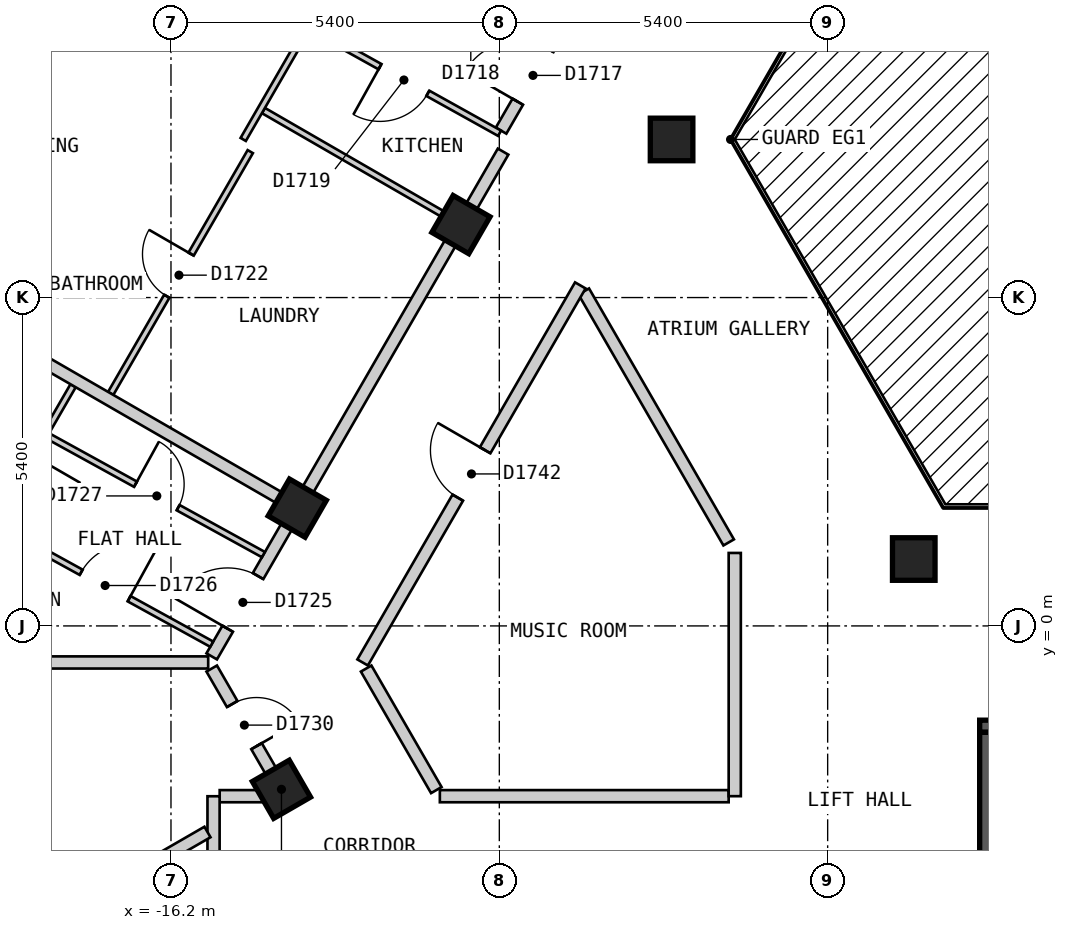
"""IFC4 building model, lengths in metres.
Left out: names, types, materials, properties, quantities, classifications, styles, units other than length and angle.
Written with IfcOpenShell. Run it as: python <this file> out.ifc"""

import sys

from ifc_helpers import new_model, si_unit, direction, frame, frame_2d, origin, origin_2d, place, context, subcontext, project, spatial, polyline, rectangle, outline, extrude, element, fill, save


model = new_model("IFC4")
c1 = context("Model", 3, precision=1e-05, world=origin(), true_north=direction((0.0, 1.0)))
c2 = subcontext(c1, "Body", "Model", "MODEL_VIEW")
j1 = project(units=[si_unit("LENGTHUNIT", "METRE"), si_unit("PLANEANGLEUNIT", "RADIAN")], contexts=[c1])
p1 = place(None, origin())
s1 = spatial("IfcSite", under=j1, at=p1, CompositionType="ELEMENT")
p2 = place(p1, origin())
s2 = spatial("IfcBuilding", under=s1, at=p2, CompositionType="ELEMENT")
p3 = place(p2, frame((0.0, 0.0, 187.2)))
s3 = spatial("IfcBuildingStorey", under=s2, at=p3, CompositionType="ELEMENT", Elevation=187.2)
for number, where, z_axis, x_axis in (
    (1, (-14.383, -2.687, 0.0), (0.0, 0.0, 1.0), (0.5, -0.866, 0.0)),
    (2, (-7.967, 8.0, 0.0), (0.0, 0.0, 1.0), (1.0, 0.0, 0.0)),
    (3, (-11.431, 6.6, 0.0), (0.0, 0.0, 1.0), (-0.5, -0.866, 0.0)),
    (4, (-3.984, 1.1, 0.0), (0.0, 0.0, 1.0), (1.0, 0.0, 0.0)),
    (5, (-14.123, 1.937, 0.0), (0.0, 0.0, 1.0), (-0.5, -0.866, 0.0)),
):
    element("IfcColumn", number, at=place(p3, frame(where, z_axis=z_axis, x_axis=x_axis)), inside=s3, PredefinedType="COLUMN", context=c2, shape_type="SweptSolid", body=[
        extrude(rectangle(XDim=0.7, YDim=0.7, at=origin_2d()), origin(), (0.0, 0.0, 1.0), 3.0),
    ])
p4 = place(p3, frame((-14.592, 21.625, 0.0), z_axis=(0.0, 0.0, 1.0), x_axis=(-0.500010537973, -0.866019319597, 0.0)))
e6 = element("IfcWall", 6, at=p4, inside=s3, PredefinedType="SOLIDWALL", context=c2, shape_type="SweptSolid", body=[
    extrude(outline(polyline([(0.0, -0.15), (22.863, -0.15), (22.783, 0.15), (0.08, 0.15), (0.0, -0.15)])), origin(), (0.0, 0.0, 1.0), 2.7),
])
p5 = place(p4, frame((2.606, 0.0, 0.15)))
e7 = element("IfcOpeningElement", 7, at=p5, cuts=e6, PredefinedType="OPENING", context=c2, shape_type="SweptSolid", body=[
    extrude(rectangle(XDim=1.5, YDim=2.1, at=frame_2d((0.75, 1.05))), frame((0.0, 0.16, 0.0), z_axis=(0.0, -1.0, 0.0), x_axis=(1.0, 0.0, 0.0)), (0.0, 0.0, 1.0), 0.32),
])
p6 = place(p4, frame((7.99, 0.0, 0.15)))
e8 = element("IfcOpeningElement", 8, at=p6, cuts=e6, PredefinedType="OPENING", context=c2, shape_type="SweptSolid", body=[
    extrude(rectangle(XDim=1.5, YDim=2.1, at=frame_2d((0.75, 1.05))), frame((0.0, 0.16, 0.0), z_axis=(0.0, -1.0, 0.0), x_axis=(1.0, 0.0, 0.0)), (0.0, 0.0, 1.0), 0.32),
])
p7 = place(p4, frame((13.373, 0.0, 0.15)))
e9 = element("IfcOpeningElement", 9, at=p7, cuts=e6, PredefinedType="OPENING", context=c2, shape_type="SweptSolid", body=[
    extrude(rectangle(XDim=1.5, YDim=2.1, at=frame_2d((0.75, 1.05))), frame((0.0, 0.16, 0.0), z_axis=(0.0, -1.0, 0.0), x_axis=(1.0, 0.0, 0.0)), (0.0, 0.0, 1.0), 0.32),
])
p8 = place(p4, frame((18.758, 0.0, 0.15)))
e10 = element("IfcOpeningElement", 10, at=p8, cuts=e6, PredefinedType="OPENING", context=c2, shape_type="SweptSolid", body=[
    extrude(rectangle(XDim=1.5, YDim=2.1, at=frame_2d((0.75, 1.05))), frame((0.0, 0.16, 0.0), z_axis=(0.0, -1.0, 0.0), x_axis=(1.0, 0.0, 0.0)), (0.0, 0.0, 1.0), 0.32),
])
p9 = place(p3, frame((-26.024, -3.025, 0.0), z_axis=(0.0, 0.0, 1.0), x_axis=(0.500018670445, -0.86601462413, 0.0)))
e11 = element("IfcWall", 11, at=p9, inside=s3, PredefinedType="SOLIDWALL", context=c2, shape_type="SweptSolid", body=[
    extrude(outline(polyline([(0.0, -0.15), (20.785, -0.15), (20.705, 0.15), (0.08, 0.15), (0.0, -0.15)])), origin(), (0.0, 0.0, 1.0), 2.7),
])
p10 = place(p9, frame((2.346, 0.0, 0.15)))
e12 = element("IfcOpeningElement", 12, at=p10, cuts=e11, PredefinedType="OPENING", context=c2, shape_type="SweptSolid", body=[
    extrude(rectangle(XDim=1.5, YDim=2.1, at=frame_2d((0.75, 1.05))), frame((0.0, 0.16, 0.0), z_axis=(0.0, -1.0, 0.0), x_axis=(1.0, 0.0, 0.0)), (0.0, 0.0, 1.0), 0.32),
])
p11 = place(p9, frame((7.21, 0.0, 0.15)))
e13 = element("IfcOpeningElement", 13, at=p11, cuts=e11, PredefinedType="OPENING", context=c2, shape_type="SweptSolid", body=[
    extrude(rectangle(XDim=1.5, YDim=2.1, at=frame_2d((0.75, 1.05))), frame((0.0, 0.16, 0.0), z_axis=(0.0, -1.0, 0.0), x_axis=(1.0, 0.0, 0.0)), (0.0, 0.0, 1.0), 0.32),
])
p12 = place(p9, frame((12.073, 0.0, 0.15)))
e14 = element("IfcOpeningElement", 14, at=p12, cuts=e11, PredefinedType="OPENING", context=c2, shape_type="SweptSolid", body=[
    extrude(rectangle(XDim=1.5, YDim=2.1, at=frame_2d((0.75, 1.05))), frame((0.0, 0.16, 0.0), z_axis=(0.0, -1.0, 0.0), x_axis=(1.0, 0.0, 0.0)), (0.0, 0.0, 1.0), 0.32),
])
p13 = place(p9, frame((16.938, 0.0, 0.15)))
e15 = element("IfcOpeningElement", 15, at=p13, cuts=e11, PredefinedType="OPENING", context=c2, shape_type="SweptSolid", body=[
    extrude(rectangle(XDim=1.5, YDim=2.1, at=frame_2d((0.75, 1.05))), frame((0.0, 0.16, 0.0), z_axis=(0.0, -1.0, 0.0), x_axis=(1.0, 0.0, 0.0)), (0.0, 0.0, 1.0), 0.32),
])
p14 = place(p3, frame((-2.9, -1.65, 0.0), z_axis=(0.0, 0.0, 1.0), x_axis=(1.0, 0.0, 0.0)))
e16 = element("IfcWall", 16, at=p14, inside=s3, PredefinedType="SOLIDWALL", context=c2, shape_type="SweptSolid", body=[
    extrude(rectangle(XDim=5.8, YDim=0.2, at=frame_2d((2.9, 0.0))), origin(), (0.0, 0.0, 1.0), 2.7),
])
p15 = place(p14, frame((0.3, 0.0, 0.0)))
e17 = element("IfcOpeningElement", 17, at=p15, cuts=e16, PredefinedType="OPENING", context=c2, shape_type="SweptSolid", body=[
    extrude(rectangle(XDim=1.2, YDim=2.1, at=frame_2d((0.6, 1.05))), frame((0.0, 0.11, 0.0), z_axis=(0.0, -1.0, 0.0), x_axis=(1.0, 0.0, 0.0)), (0.0, 0.0, 1.0), 0.22),
])
p16 = place(p3, frame((-2.8, -4.5, 0.0), z_axis=(0.0, 0.0, 1.0), x_axis=(0.0, 1.0, 0.0)))
e18 = element("IfcWall", 18, at=p16, inside=s3, PredefinedType="SOLIDWALL", context=c2, shape_type="SweptSolid", body=[
    extrude(rectangle(XDim=2.75, YDim=0.2, at=frame_2d((1.375, 0.0))), origin(), (0.0, 0.0, 1.0), 2.7),
])
p17 = place(p3, frame((-9.411, 5.5, 0.0), z_axis=(0.0, 0.0, 1.0), x_axis=(0.500018099276, -0.86601495391, 0.0)))
e19 = element("IfcWall", 19, at=p17, inside=s3, PredefinedType="PARTITIONING", context=c2, shape_type="SweptSolid", body=[
    extrude(rectangle(XDim=4.765, YDim=0.2, at=frame_2d((2.383, 0.0))), origin(), (0.0, 0.0, 1.0), 2.7),
])
p18 = place(p3, frame((-12.99, -0.701, 0.0), z_axis=(0.0, 0.0, 1.0), x_axis=(0.499972710878, -0.866041158593, 0.0)))
e20 = element("IfcWall", 20, at=p18, inside=s3, PredefinedType="PARTITIONING", context=c2, shape_type="SweptSolid", body=[
    extrude(rectangle(XDim=2.308, YDim=0.2, at=frame_2d((1.154, 0.0))), origin(), (0.0, 0.0, 1.0), 2.7),
])
p19 = place(p3, frame((-15.53, -0.701, 0.0), z_axis=(0.0, 0.0, 1.0), x_axis=(0.499972710878, -0.866041158593, 0.0)))
e21 = element("IfcWall", 21, at=p19, inside=s3, PredefinedType="PARTITIONING", context=c2, shape_type="SweptSolid", body=[
    extrude(rectangle(XDim=2.308, YDim=0.2, at=frame_2d((1.154, 0.0))), origin(), (0.0, 0.0, 1.0), 2.7),
])
p20 = place(p19, frame((0.674, 0.0, 0.0)))
e22 = element("IfcOpeningElement", 22, at=p20, cuts=e21, PredefinedType="OPENING", context=c2, shape_type="SweptSolid", body=[
    extrude(rectangle(XDim=0.8, YDim=2.1, at=frame_2d((0.4, 1.05))), frame((0.0, 0.11, 0.0), z_axis=(0.0, -1.0, 0.0), x_axis=(1.0, 0.0, 0.0)), (0.0, 0.0, 1.0), 0.22),
])
p21 = place(p3, frame((-15.399, -2.8, 0.0), z_axis=(0.0, 0.0, 1.0), x_axis=(1.0, 0.0, 0.0)))
e23 = element("IfcWall", 23, at=p21, inside=s3, PredefinedType="PARTITIONING", context=c2, shape_type="SweptSolid", body=[
    extrude(rectangle(XDim=1.081, YDim=0.2, at=frame_2d((0.541, 0.0))), origin(), (0.0, 0.0, 1.0), 2.7),
])
p22 = place(p3, frame((-11.778, -2.8, 0.0), z_axis=(0.0, 0.0, 1.0), x_axis=(1.0, 0.0, 0.0)))
e24 = element("IfcWall", 24, at=p22, inside=s3, PredefinedType="PARTITIONING", context=c2, shape_type="SweptSolid", body=[
    extrude(rectangle(XDim=4.75, YDim=0.2, at=frame_2d((2.375, 0.0))), origin(), (0.0, 0.0, 1.0), 2.7),
])
p23 = place(p3, frame((-13.048, -0.601, 0.0), z_axis=(0.0, 0.0, 1.0), x_axis=(0.499982180423, 0.866035691677, 0.0)))
e25 = element("IfcWall", 25, at=p23, inside=s3, PredefinedType="PARTITIONING", context=c2, shape_type="SweptSolid", body=[
    extrude(rectangle(XDim=7.16, YDim=0.2, at=frame_2d((3.58, 0.0))), origin(), (0.0, 0.0, 1.0), 2.7),
])
p24 = place(p23, frame((3.13, 0.0, 0.0)))
e26 = element("IfcOpeningElement", 26, at=p24, cuts=e25, PredefinedType="OPENING", context=c2, shape_type="SweptSolid", body=[
    extrude(rectangle(XDim=0.9, YDim=2.1, at=frame_2d((0.45, 1.05))), frame((0.0, 0.11, 0.0), z_axis=(0.0, -1.0, 0.0), x_axis=(1.0, 0.0, 0.0)), (0.0, 0.0, 1.0), 0.22),
])
p25 = place(p3, frame((-15.53, -0.501, 0.0), z_axis=(0.0, 0.0, 1.0), x_axis=(0.499952498232, 0.866052827206, 0.0)))
e27 = element("IfcWall", 27, at=p25, inside=s3, PredefinedType="PARTITIONING", context=c2, shape_type="SweptSolid", body=[
    extrude(rectangle(XDim=9.585, YDim=0.2, at=frame_2d((4.792, 0.0))), origin(), (0.0, 0.0, 1.0), 2.7),
])
p26 = place(p25, frame((0.525, 0.0, 0.0)))
e28 = element("IfcOpeningElement", 28, at=p26, cuts=e27, PredefinedType="OPENING", context=c2, shape_type="SweptSolid", body=[
    extrude(rectangle(XDim=1.0, YDim=2.1, at=frame_2d((0.5, 1.05))), frame((0.0, 0.11, 0.0), z_axis=(0.0, -1.0, 0.0), x_axis=(1.0, 0.0, 0.0)), (0.0, 0.0, 1.0), 0.22),
])
p27 = place(p3, frame((-10.771, 8.145, 0.0), z_axis=(0.0, 0.0, 1.0), x_axis=(0.500048075867, 0.865997645391, 0.0)))
e29 = element("IfcWall", 29, at=p27, inside=s3, PredefinedType="PARTITIONING", context=c2, shape_type="SweptSolid", body=[
    extrude(rectangle(XDim=10.687, YDim=0.2, at=frame_2d((5.344, 0.0))), origin(), (0.0, 0.0, 1.0), 2.7),
])
p28 = place(p27, frame((0.549, 0.0, 0.0)))
e30 = element("IfcOpeningElement", 30, at=p28, cuts=e29, PredefinedType="OPENING", context=c2, shape_type="SweptSolid", body=[
    extrude(rectangle(XDim=1.0, YDim=2.1, at=frame_2d((0.5, 1.05))), frame((0.0, 0.11, 0.0), z_axis=(0.0, -1.0, 0.0), x_axis=(1.0, 0.0, 0.0)), (0.0, 0.0, 1.0), 0.22),
])
p29 = place(p3, frame((-6.928, -2.8, 0.0), z_axis=(0.0, 0.0, 1.0), x_axis=(0.0, 1.0, 0.0)))
e31 = element("IfcWall", 31, at=p29, inside=s3, PredefinedType="PARTITIONING", context=c2, shape_type="SweptSolid", body=[
    extrude(rectangle(XDim=4.0, YDim=0.2, at=frame_2d((2.0, 0.0))), origin(), (0.0, 0.0, 1.0), 2.7),
])
p30 = place(p3, frame((-15.5, -6.6, 0.0), z_axis=(0.0, 0.0, 1.0), x_axis=(0.0, 1.0, 0.0)))
e32 = element("IfcWall", 32, at=p30, inside=s3, PredefinedType="PARTITIONING", context=c2, shape_type="SweptSolid", body=[
    extrude(rectangle(XDim=3.799, YDim=0.2, at=frame_2d((1.899, 0.0))), origin(), (0.0, 0.0, 1.0), 2.7),
])
p31 = place(p3, frame((-18.229, 3.126, 0.0), z_axis=(0.0, 0.0, 1.0), x_axis=(0.876123002581, -0.482087631399, 0.0)))
e33 = element("IfcWall", 33, at=p31, inside=s3, PredefinedType="PARTITIONING", context=c2, shape_type="SweptSolid", body=[
    extrude(rectangle(XDim=4.051, YDim=0.1, at=frame_2d((2.025, 0.0))), origin(), (0.0, 0.0, 1.0), 2.7),
])
p32 = place(p31, frame((1.65, 0.0, 0.0)))
e34 = element("IfcOpeningElement", 34, at=p32, cuts=e33, PredefinedType="OPENING", context=c2, shape_type="SweptSolid", body=[
    extrude(rectangle(XDim=0.8, YDim=2.1, at=frame_2d((0.4, 1.05))), frame((0.0, 0.06, 0.0), z_axis=(0.0, -1.0, 0.0), x_axis=(1.0, 0.0, 0.0)), (0.0, 0.0, 1.0), 0.12),
])
p33 = place(p3, frame((-19.079, 1.653, 0.0), z_axis=(0.0, 0.0, 1.0), x_axis=(0.876097546615, -0.482133890963, 0.0)))
e35 = element("IfcWall", 35, at=p33, inside=s3, PredefinedType="PARTITIONING", context=c2, shape_type="SweptSolid", body=[
    extrude(rectangle(XDim=4.051, YDim=0.1, at=frame_2d((2.025, 0.0))), origin(), (0.0, 0.0, 1.0), 2.7),
])
p34 = place(p33, frame((1.6, 0.0, 0.0)))
e36 = element("IfcOpeningElement", 36, at=p34, cuts=e35, PredefinedType="OPENING", context=c2, shape_type="SweptSolid", body=[
    extrude(rectangle(XDim=0.9, YDim=2.1, at=frame_2d((0.45, 1.05))), frame((0.0, 0.06, 0.0), z_axis=(0.0, -1.0, 0.0), x_axis=(1.0, 0.0, 0.0)), (0.0, 0.0, 1.0), 0.12),
])
p35 = place(p3, frame((-13.898, 9.829, 0.0), z_axis=(0.0, 0.0, 1.0), x_axis=(0.873715787747, -0.486436760784, 0.0)))
e37 = element("IfcWall", 37, at=p35, inside=s3, PredefinedType="PARTITIONING", context=c2, shape_type="SweptSolid", body=[
    extrude(rectangle(XDim=3.55, YDim=0.1, at=frame_2d((1.775, 0.0))), origin(), (0.0, 0.0, 1.0), 2.7),
])
p36 = place(p35, frame((1.3, 0.0, 0.0)))
e38 = element("IfcOpeningElement", 38, at=p36, cuts=e37, PredefinedType="OPENING", context=c2, shape_type="SweptSolid", body=[
    extrude(rectangle(XDim=0.9, YDim=2.1, at=frame_2d((0.45, 1.05))), frame((0.0, 0.06, 0.0), z_axis=(0.0, -1.0, 0.0), x_axis=(1.0, 0.0, 0.0)), (0.0, 0.0, 1.0), 0.12),
])
p37 = place(p3, frame((-14.679, 8.475, 0.0), z_axis=(0.0, 0.0, 1.0), x_axis=(0.865995104784, -0.500052475737, 0.0)))
e39 = element("IfcWall", 39, at=p37, inside=s3, PredefinedType="PARTITIONING", context=c2, shape_type="SweptSolid", body=[
    extrude(rectangle(XDim=3.65, YDim=0.1, at=frame_2d((1.825, 0.0))), origin(), (0.0, 0.0, 1.0), 2.7),
])
p38 = place(p3, frame((-17.191, 3.824, 0.0), z_axis=(0.0, 0.0, 1.0), x_axis=(0.499891250406, 0.866088181288, 0.0)))
e40 = element("IfcWall", 40, at=p38, inside=s3, PredefinedType="PARTITIONING", context=c2, shape_type="SweptSolid", body=[
    extrude(rectangle(XDim=4.591, YDim=0.1, at=frame_2d((2.295, 0.0))), origin(), (0.0, 0.0, 1.0), 2.7),
])
p39 = place(p38, frame((1.845, 0.0, 0.0)))
e41 = element("IfcOpeningElement", 41, at=p39, cuts=e40, PredefinedType="OPENING", context=c2, shape_type="SweptSolid", body=[
    extrude(rectangle(XDim=0.8, YDim=2.1, at=frame_2d((0.4, 1.05))), frame((0.0, 0.06, 0.0), z_axis=(0.0, -1.0, 0.0), x_axis=(1.0, 0.0, 0.0)), (0.0, 0.0, 1.0), 0.12),
])
p40 = place(p3, frame((-15.012, 8.0, 0.0), z_axis=(0.0, 0.0, 1.0), x_axis=(0.500047346826, 0.865998066356, 0.0)))
e42 = element("IfcWall", 42, at=p40, inside=s3, PredefinedType="PARTITIONING", context=c2, shape_type="SweptSolid", body=[
    extrude(rectangle(XDim=10.971, YDim=0.1, at=frame_2d((5.486, 0.0))), origin(), (0.0, 0.0, 1.0), 2.7),
])
p41 = place(p40, frame((2.791, 0.0, 0.0)))
e43 = element("IfcOpeningElement", 43, at=p41, cuts=e42, PredefinedType="OPENING", context=c2, shape_type="SweptSolid", body=[
    extrude(rectangle(XDim=0.9, YDim=2.1, at=frame_2d((0.45, 1.05))), frame((0.0, 0.06, 0.0), z_axis=(0.0, -1.0, 0.0), x_axis=(1.0, 0.0, 0.0)), (0.0, 0.0, 1.0), 0.12),
])
p42 = place(p40, frame((8.124, 0.0, 0.0)))
e44 = element("IfcOpeningElement", 44, at=p42, cuts=e42, PredefinedType="OPENING", context=c2, shape_type="SweptSolid", body=[
    extrude(rectangle(XDim=0.8, YDim=2.1, at=frame_2d((0.4, 1.05))), frame((0.0, 0.06, 0.0), z_axis=(0.0, -1.0, 0.0), x_axis=(1.0, 0.0, 0.0)), (0.0, 0.0, 1.0), 0.12),
])
p43 = place(p3, frame((-19.283, 1.4, 0.0), z_axis=(0.0, 0.0, 1.0), x_axis=(0.500160189342, 0.865932898669, 0.0)))
e45 = element("IfcWall", 45, at=p43, inside=s3, PredefinedType="PARTITIONING", context=c2, shape_type="SweptSolid", body=[
    extrude(rectangle(XDim=2.945, YDim=0.1, at=frame_2d((1.472, 0.0))), origin(), (0.0, 0.0, 1.0), 2.7),
])
p44 = place(p43, frame((0.721, 0.0, 0.0)))
e46 = element("IfcOpeningElement", 46, at=p44, cuts=e45, PredefinedType="OPENING", context=c2, shape_type="SweptSolid", body=[
    extrude(rectangle(XDim=0.9, YDim=2.1, at=frame_2d((0.45, 1.05))), frame((0.0, 0.06, 0.0), z_axis=(0.0, -1.0, 0.0), x_axis=(1.0, 0.0, 0.0)), (0.0, 0.0, 1.0), 0.12),
])
p45 = place(p3, frame((-22.87, 6.987, 0.0), z_axis=(0.0, 0.0, 1.0), x_axis=(0.866022959057, -0.500004234368, 0.0)))
e47 = element("IfcWall", 47, at=p45, inside=s3, PredefinedType="PARTITIONING", context=c2, shape_type="SweptSolid", body=[
    extrude(rectangle(XDim=10.0, YDim=0.2, at=frame_2d((5.0, 0.0))), origin(), (0.0, 0.0, 1.0), 2.7),
])
p46 = place(p3, frame((-20.238, -0.601, 0.0), z_axis=(0.0, 0.0, 1.0), x_axis=(1.0, 0.0, 0.0)))
e48 = element("IfcWall", 48, at=p46, inside=s3, PredefinedType="PARTITIONING", context=c2, shape_type="SweptSolid", body=[
    extrude(rectangle(XDim=4.65, YDim=0.2, at=frame_2d((2.325, 0.0))), origin(), (0.0, 0.0, 1.0), 2.7),
])
p47 = place(p3, frame((-23.13, -7.737, 0.0), z_axis=(0.0, 0.0, 1.0), x_axis=(0.86598451299, 0.500070818246, 0.0)))
e49 = element("IfcWall", 49, at=p47, inside=s3, PredefinedType="PARTITIONING", context=c2, shape_type="SweptSolid", body=[
    extrude(rectangle(XDim=8.695, YDim=0.2, at=frame_2d((4.348, 0.0))), origin(), (0.0, 0.0, 1.0), 2.7),
])
p48 = place(p28, origin())
e50 = element("IfcDoor", 50, at=p48, inside=s3, OperationType="SINGLE_SWING_LEFT", PredefinedType="DOOR", context=c2, shape_type="SweptSolid", body=[
    extrude(rectangle(XDim=1.0, YDim=2.1, at=frame_2d((0.5, 1.05))), frame((0.0, 0.025, 0.0), z_axis=(0.0, -1.0, 0.0), x_axis=(1.0, 0.0, 0.0)), (0.0, 0.0, 1.0), 0.05),
])
fill(e30, e50)
p49 = place(p36, origin())
e51 = element("IfcDoor", 51, at=p49, inside=s3, OperationType="SINGLE_SWING_LEFT", PredefinedType="DOOR", context=c2, shape_type="SweptSolid", body=[
    extrude(rectangle(XDim=0.9, YDim=2.1, at=frame_2d((0.45, 1.05))), frame((0.0, 0.025, 0.0), z_axis=(0.0, -1.0, 0.0), x_axis=(1.0, 0.0, 0.0)), (0.0, 0.0, 1.0), 0.05),
])
fill(e38, e51)
p50 = place(p39, origin())
e52 = element("IfcDoor", 52, at=p50, inside=s3, OperationType="SINGLE_SWING_RIGHT", PredefinedType="DOOR", context=c2, shape_type="SweptSolid", body=[
    extrude(rectangle(XDim=0.8, YDim=2.1, at=frame_2d((0.4, 1.05))), frame((0.0, 0.025, 0.0), z_axis=(0.0, -1.0, 0.0), x_axis=(1.0, 0.0, 0.0)), (0.0, 0.0, 1.0), 0.05),
])
fill(e41, e52)
p51 = place(p26, origin())
e53 = element("IfcDoor", 53, at=p51, inside=s3, OperationType="SINGLE_SWING_LEFT", PredefinedType="DOOR", context=c2, shape_type="SweptSolid", body=[
    extrude(rectangle(XDim=1.0, YDim=2.1, at=frame_2d((0.5, 1.05))), frame((0.0, 0.025, 0.0), z_axis=(0.0, -1.0, 0.0), x_axis=(1.0, 0.0, 0.0)), (0.0, 0.0, 1.0), 0.05),
])
fill(e28, e53)
p52 = place(p34, origin())
e54 = element("IfcDoor", 54, at=p52, inside=s3, OperationType="SINGLE_SWING_RIGHT", PredefinedType="DOOR", context=c2, shape_type="SweptSolid", body=[
    extrude(rectangle(XDim=0.9, YDim=2.1, at=frame_2d((0.45, 1.05))), frame((0.0, 0.025, 0.0), z_axis=(0.0, -1.0, 0.0), x_axis=(1.0, 0.0, 0.0)), (0.0, 0.0, 1.0), 0.05),
])
fill(e36, e54)
p53 = place(p32, origin())
e55 = element("IfcDoor", 55, at=p53, inside=s3, OperationType="SINGLE_SWING_LEFT", PredefinedType="DOOR", context=c2, shape_type="SweptSolid", body=[
    extrude(rectangle(XDim=0.8, YDim=2.1, at=frame_2d((0.4, 1.05))), frame((0.0, 0.025, 0.0), z_axis=(0.0, -1.0, 0.0), x_axis=(1.0, 0.0, 0.0)), (0.0, 0.0, 1.0), 0.05),
])
fill(e34, e55)
p54 = place(p20, origin())
e56 = element("IfcDoor", 56, at=p54, inside=s3, OperationType="SINGLE_SWING_RIGHT", PredefinedType="DOOR", context=c2, shape_type="SweptSolid", body=[
    extrude(rectangle(XDim=0.8, YDim=2.1, at=frame_2d((0.4, 1.05))), frame((0.0, 0.025, 0.0), z_axis=(0.0, -1.0, 0.0), x_axis=(1.0, 0.0, 0.0)), (0.0, 0.0, 1.0), 0.05),
])
fill(e22, e56)
p55 = place(p24, origin())
e57 = element("IfcDoor", 57, at=p55, inside=s3, OperationType="SINGLE_SWING_RIGHT", PredefinedType="DOOR", context=c2, shape_type="SweptSolid", body=[
    extrude(rectangle(XDim=0.9, YDim=2.1, at=frame_2d((0.45, 1.05))), frame((0.0, 0.025, 0.0), z_axis=(0.0, -1.0, 0.0), x_axis=(1.0, 0.0, 0.0)), (0.0, 0.0, 1.0), 0.05),
])
fill(e26, e57)
save(model, sys.argv[1])
